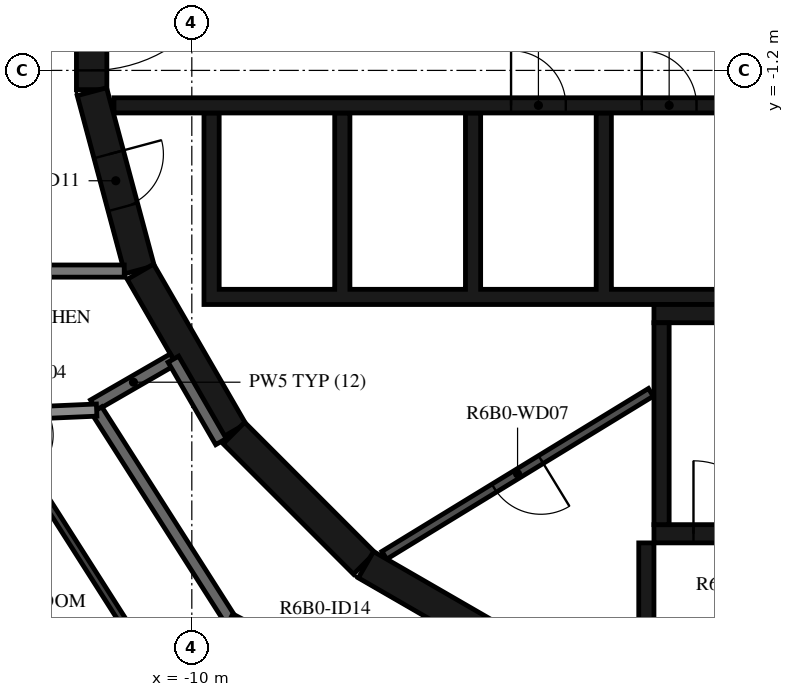
"""IFC4 building model, lengths in metres.
Left out: names, types, materials, properties, quantities, classifications, styles, units other than length and angle.
Written with IfcOpenShell. Run it as: python <this file> out.ifc"""

import sys

from ifc_helpers import new_model, si_unit, direction, frame, frame_2d, origin, place, context, subcontext, project, spatial, polyline, rectangle, outline, extrude, element, fill, save


model = new_model("IFC4")
c1 = context("Model", 3, precision=1e-05, world=origin(), true_north=direction((0.0, 1.0)))
c2 = subcontext(c1, "Body", "Model", "MODEL_VIEW")
j1 = project(units=[si_unit("LENGTHUNIT", "METRE"), si_unit("PLANEANGLEUNIT", "RADIAN")], contexts=[c1])
p1 = place(None, origin())
s1 = spatial("IfcSite", under=j1, at=p1, CompositionType="ELEMENT")
p2 = place(p1, origin())
s2 = spatial("IfcBuilding", under=s1, at=p2, CompositionType="ELEMENT")
p3 = place(p2, frame((0.0, 0.0, 240.7)))
s3 = spatial("IfcBuildingStorey", under=s2, at=p3, CompositionType="ELEMENT", Elevation=240.7)
p4 = place(p3, frame((-11.647, 1.516, 0.0), z_axis=(0.0, 0.0, 1.0), x_axis=(0.0, -1.0, 0.0)))
e1 = element("IfcWall", 1, at=p4, inside=s3, PredefinedType="SHEAR", context=c2, shape_type="SweptSolid", body=[
    extrude(rectangle(XDim=3.033, YDim=0.5, at=frame_2d((1.516, 0.0))), origin(), (0.0, 0.0, 1.0), 3.12),
])
p5 = place(p4, frame((0.316, 0.0, 0.0)))
e2 = element("IfcOpeningElement", 2, at=p5, cuts=e1, PredefinedType="OPENING", context=c2, shape_type="SweptSolid", body=[
    extrude(rectangle(XDim=2.4, YDim=2.1, at=frame_2d((1.2, 1.05))), frame((0.0, 0.26, 0.0), z_axis=(0.0, -1.0, 0.0), x_axis=(1.0, 0.0, 0.0)), (0.0, 0.0, 1.0), 0.52),
])
p6 = place(p3, frame((-11.643, -1.55, 0.0), z_axis=(0.0, 0.0, 1.0), x_axis=(0.258734743916, -0.965948410781, 0.0)))
e3 = element("IfcWall", 3, at=p6, inside=s3, PredefinedType="SHEAR", context=c2, shape_type="SweptSolid", body=[
    extrude(rectangle(XDim=3.033, YDim=0.5, at=frame_2d((1.516, 0.0))), origin(), (0.0, 0.0, 1.0), 3.12),
])
p7 = place(p6, frame((1.066, 0.0, 0.0)))
e4 = element("IfcOpeningElement", 4, at=p7, cuts=e3, PredefinedType="OPENING", context=c2, shape_type="SweptSolid", body=[
    extrude(rectangle(XDim=0.9, YDim=2.1, at=frame_2d((0.45, 1.05))), frame((0.0, 0.26, 0.0), z_axis=(0.0, -1.0, 0.0), x_axis=(1.0, 0.0, 0.0)), (0.0, 0.0, 1.0), 0.52),
])
p8 = place(p3, frame((-10.845, -4.51, 0.0), z_axis=(0.0, 0.0, 1.0), x_axis=(0.500087131594, -0.865975092491, 0.0)))
e5 = element("IfcWall", 5, at=p8, inside=s3, PredefinedType="SHEAR", context=c2, shape_type="SweptSolid", body=[
    extrude(rectangle(XDim=3.033, YDim=0.5, at=frame_2d((1.516, 0.0))), origin(), (0.0, 0.0, 1.0), 3.12),
])
p9 = place(p3, frame((-9.308, -7.164, 0.0), z_axis=(0.0, 0.0, 1.0), x_axis=(0.707106781187, -0.707106781187, 0.0)))
e6 = element("IfcWall", 6, at=p9, inside=s3, PredefinedType="SHEAR", context=c2, shape_type="SweptSolid", body=[
    extrude(rectangle(XDim=3.032, YDim=0.5, at=frame_2d((1.516, 0.0))), origin(), (0.0, 0.0, 1.0), 3.12),
])
p10 = place(p3, frame((-7.137, -9.329, 0.0), z_axis=(0.0, 0.0, 1.0), x_axis=(0.865975092491, -0.500087131594, 0.0)))
e7 = element("IfcWall", 7, at=p10, inside=s3, PredefinedType="SHEAR", context=c2, shape_type="SweptSolid", body=[
    extrude(rectangle(XDim=3.033, YDim=0.5, at=frame_2d((1.516, 0.0))), origin(), (0.0, 0.0, 1.0), 3.12),
])
p11 = place(p3, frame((-2.275, -8.67, 0.0), z_axis=(0.0, 0.0, 1.0), x_axis=(0.0, 1.0, 0.0)))
e8 = element("IfcWall", 8, at=p11, inside=s3, PredefinedType="SHEAR", context=c2, shape_type="SweptSolid", body=[
    extrude(rectangle(XDim=3.32, YDim=0.25, at=frame_2d((1.66, 0.0))), origin(), (0.0, 0.0, 1.0), 3.12),
])
p12 = place(p3, frame((-2.4, -5.2, 0.0), z_axis=(0.0, 0.0, 1.0), x_axis=(1.0, 0.0, 0.0)))
e9 = element("IfcWall", 9, at=p12, inside=s3, PredefinedType="SHEAR", context=c2, shape_type="SweptSolid", body=[
    extrude(rectangle(XDim=7.05, YDim=0.3, at=frame_2d((3.525, 0.0))), origin(), (0.0, 0.0, 1.0), 3.12),
])
p13 = place(p3, frame((-2.4, -8.82, 0.0), z_axis=(0.0, 0.0, 1.0), x_axis=(1.0, 0.0, 0.0)))
e10 = element("IfcWall", 10, at=p13, inside=s3, PredefinedType="SHEAR", context=c2, shape_type="SweptSolid", body=[
    extrude(rectangle(XDim=2.5, YDim=0.3, at=frame_2d((1.25, 0.0))), origin(), (0.0, 0.0, 1.0), 3.12),
])
p14 = place(p13, frame((0.65, 0.0, 0.0)))
e11 = element("IfcOpeningElement", 11, at=p14, cuts=e10, PredefinedType="OPENING", context=c2, shape_type="SweptSolid", body=[
    extrude(rectangle(XDim=1.2, YDim=2.1, at=frame_2d((0.6, 1.05))), frame((0.0, 0.16, 0.0), z_axis=(0.0, -1.0, 0.0), x_axis=(1.0, 0.0, 0.0)), (0.0, 0.0, 1.0), 0.32),
])
p15 = place(p3, frame((-2.525, -8.97, 0.0), z_axis=(0.0, 0.0, 1.0), x_axis=(0.0, -1.0, 0.0)))
e12 = element("IfcWall", 12, at=p15, inside=s3, PredefinedType="SHEAR", context=c2, shape_type="SweptSolid", body=[
    extrude(rectangle(XDim=2.11, YDim=0.25, at=frame_2d((1.055, 0.0))), origin(), (0.0, 0.0, 1.0), 3.12),
])
p16 = place(p3, origin())
e13 = element("IfcWall", 13, at=p16, inside=s3, PredefinedType="SHEAR", context=c2, shape_type="SweptSolid", body=[
    extrude(outline(polyline([(9.8, -5.05), (9.8, -4.8), (9.8, -1.9), (9.55, -1.9), (9.55, -4.8), (7.65, -4.8), (7.65, -1.9), (7.4, -1.9), (7.4, -4.8), (5.5, -4.8), (5.5, -1.9), (5.25, -1.9), (5.25, -4.8), (3.35, -4.8), (3.35, -1.9), (3.1, -1.9), (3.1, -4.8), (1.2, -4.8), (1.2, -1.9), (0.95, -1.9), (0.95, -4.8), (-0.95, -4.8), (-0.95, -1.9), (-1.2, -1.9), (-1.2, -4.8), (-3.1, -4.8), (-3.1, -1.9), (-3.35, -1.9), (-3.35, -4.8), (-5.25, -4.8), (-5.25, -1.9), (-5.5, -1.9), (-5.5, -4.8), (-7.4, -4.8), (-7.4, -1.9), (-7.65, -1.9), (-7.65, -4.8), (-9.55, -4.8), (-9.55, -1.9), (-9.8, -1.9), (-9.8, -4.8), (-9.8, -5.05), (9.8, -5.05)])), origin(), (0.0, 0.0, 1.0), 3.12),
])
p17 = place(p3, frame((-11.28, -1.775, 0.0), z_axis=(0.0, 0.0, 1.0), x_axis=(1.0, 0.0, 0.0)))
e14 = element("IfcWall", 14, at=p17, inside=s3, PredefinedType="SHEAR", context=c2, shape_type="SweptSolid", body=[
    extrude(rectangle(XDim=14.38, YDim=0.25, at=frame_2d((7.19, 0.0))), origin(), (0.0, 0.0, 1.0), 3.12),
])
p18 = place(p17, frame((12.88, 0.0, 0.0)))
e15 = element("IfcOpeningElement", 15, at=p18, cuts=e14, PredefinedType="OPENING", context=c2, shape_type="SweptSolid", body=[
    extrude(rectangle(XDim=1.1, YDim=2.1, at=frame_2d((0.55, 1.05))), frame((0.0, 0.135, 0.0), z_axis=(0.0, -1.0, 0.0), x_axis=(1.0, 0.0, 0.0)), (0.0, 0.0, 1.0), 0.27),
])
p19 = place(p17, frame((6.53, 0.0, 0.0)))
e16 = element("IfcOpeningElement", 16, at=p19, cuts=e14, PredefinedType="OPENING", context=c2, shape_type="SweptSolid", body=[
    extrude(rectangle(XDim=0.9, YDim=2.1, at=frame_2d((0.45, 1.05))), frame((0.0, 0.135, 0.0), z_axis=(0.0, -1.0, 0.0), x_axis=(1.0, 0.0, 0.0)), (0.0, 0.0, 1.0), 0.27),
])
p20 = place(p17, frame((8.68, 0.0, 0.0)))
e17 = element("IfcOpeningElement", 17, at=p20, cuts=e14, PredefinedType="OPENING", context=c2, shape_type="SweptSolid", body=[
    extrude(rectangle(XDim=0.9, YDim=2.1, at=frame_2d((0.45, 1.05))), frame((0.0, 0.135, 0.0), z_axis=(0.0, -1.0, 0.0), x_axis=(1.0, 0.0, 0.0)), (0.0, 0.0, 1.0), 0.27),
])
p21 = place(p17, frame((10.83, 0.0, 0.0)))
e18 = element("IfcOpeningElement", 18, at=p21, cuts=e14, PredefinedType="OPENING", context=c2, shape_type="SweptSolid", body=[
    extrude(rectangle(XDim=0.9, YDim=2.1, at=frame_2d((0.45, 1.05))), frame((0.0, 0.135, 0.0), z_axis=(0.0, -1.0, 0.0), x_axis=(1.0, 0.0, 0.0)), (0.0, 0.0, 1.0), 0.27),
])
p22 = place(p3, frame((-2.451, -6.495, 0.0), z_axis=(0.0, 0.0, 1.0), x_axis=(-0.853250115418, -0.521501908471, 0.0)))
e19 = element("IfcWall", 19, at=p22, inside=s3, PredefinedType="PARTITIONING", context=c2, shape_type="SweptSolid", body=[
    extrude(rectangle(XDim=5.137, YDim=0.15, at=frame_2d((2.569, 0.0))), origin(), (0.0, 0.0, 1.0), 3.12),
])
p23 = place(p22, frame((2.119, 0.0, 0.0)))
e20 = element("IfcOpeningElement", 20, at=p23, cuts=e19, PredefinedType="OPENING", context=c2, shape_type="SweptSolid", body=[
    extrude(rectangle(XDim=0.9, YDim=2.1, at=frame_2d((0.45, 1.05))), frame((0.0, 0.085, 0.0), z_axis=(0.0, -1.0, 0.0), x_axis=(1.0, 0.0, 0.0)), (0.0, 0.0, 1.0), 0.17),
])
p24 = place(p3, frame((-10.303, -5.949, 0.0), z_axis=(0.0, 0.0, 1.0), x_axis=(-0.866043382451, -0.499968858743, 0.0)))
e21 = element("IfcWall", 21, at=p24, inside=s3, PredefinedType="STANDARD", context=c2, shape_type="SweptSolid", body=[
    extrude(rectangle(XDim=1.515, YDim=0.2, at=frame_2d((0.758, 0.0))), origin(), (0.0, 0.0, 1.0), 3.12),
])
p25 = place(p3, frame((-9.52, -7.305, 0.0), z_axis=(0.0, 0.0, 1.0), x_axis=(-0.500028278809, 0.866009076391, 0.0)))
e22 = element("IfcWall", 22, at=p25, inside=s3, PredefinedType="STANDARD", context=c2, shape_type="SweptSolid", body=[
    extrude(rectangle(XDim=1.566, YDim=0.2, at=frame_2d((0.783, 0.0))), origin(), (0.0, 0.0, 1.0), 3.12),
])
p26 = place(p3, frame((-11.565, -6.786, 0.0), z_axis=(0.0, 0.0, 1.0), x_axis=(0.537297327359, -0.843392898958, 0.0)))
e23 = element("IfcWall", 23, at=p26, inside=s3, PredefinedType="STANDARD", context=c2, shape_type="SweptSolid", body=[
    extrude(rectangle(XDim=4.081, YDim=0.2, at=frame_2d((2.041, 0.0))), origin(), (0.0, 0.0, 1.0), 3.12),
])
p27 = place(p3, frame((-9.372, -10.228, 0.0), z_axis=(0.0, 0.0, 1.0), x_axis=(0.887005184532, -0.461759464021, 0.0)))
e24 = element("IfcWall", 24, at=p27, inside=s3, PredefinedType="STANDARD", context=c2, shape_type="SweptSolid", body=[
    extrude(rectangle(XDim=7.181, YDim=0.2, at=frame_2d((3.591, 0.0))), origin(), (0.0, 0.0, 1.0), 3.12),
])
p28 = place(p27, frame((2.391, 0.0, 0.0)))
e25 = element("IfcOpeningElement", 25, at=p28, cuts=e24, PredefinedType="OPENING", context=c2, shape_type="SweptSolid", body=[
    extrude(rectangle(XDim=1.0, YDim=2.1, at=frame_2d((0.5, 1.05))), frame((0.0, 0.11, 0.0), z_axis=(0.0, -1.0, 0.0), x_axis=(1.0, 0.0, 0.0)), (0.0, 0.0, 1.0), 0.22),
])
p29 = place(p3, frame((-17.655, -4.5, 0.0), z_axis=(0.0, 0.0, 1.0), x_axis=(1.0, 0.0, 0.0)))
e26 = element("IfcWall", 26, at=p29, inside=s3, PredefinedType="STANDARD", context=c2, shape_type="SweptSolid", body=[
    extrude(rectangle(XDim=6.543, YDim=0.2, at=frame_2d((3.272, 0.0))), origin(), (0.0, 0.0, 1.0), 3.12),
])
p30 = place(p3, frame((-17.544, -7.047, 0.0), z_axis=(0.0, 0.0, 1.0), x_axis=(0.999046743906, 0.043653218555, 0.0)))
e27 = element("IfcWall", 27, at=p30, inside=s3, PredefinedType="STANDARD", context=c2, shape_type="SweptSolid", body=[
    extrude(rectangle(XDim=5.984, YDim=0.2, at=frame_2d((2.992, 0.0))), origin(), (0.0, 0.0, 1.0), 2.73),
])
p31 = place(p3, frame((-13.295, -6.862, 0.0), z_axis=(0.0, 0.0, 1.0), x_axis=(0.537285929223, -0.84340016022, 0.0)))
e28 = element("IfcWall", 28, at=p31, inside=s3, PredefinedType="PARTITIONING", context=c2, shape_type="SweptSolid", body=[
    extrude(rectangle(XDim=5.349, YDim=0.12, at=frame_2d((2.675, 0.0))), origin(), (0.0, 0.0, 1.0), 3.12),
])
p32 = place(p31, frame((0.4, 0.0, 0.0)))
e29 = element("IfcOpeningElement", 29, at=p32, cuts=e28, PredefinedType="OPENING", context=c2, shape_type="SweptSolid", body=[
    extrude(rectangle(XDim=0.8, YDim=2.1, at=frame_2d((0.4, 1.05))), frame((0.0, 0.07, 0.0), z_axis=(0.0, -1.0, 0.0), x_axis=(1.0, 0.0, 0.0)), (0.0, 0.0, 1.0), 0.14),
])
p33 = place(p14, origin())
e30 = element("IfcDoor", 30, at=p33, inside=s3, OperationType="SINGLE_SWING_LEFT", PredefinedType="DOOR", context=c2, shape_type="SweptSolid", body=[
    extrude(rectangle(XDim=1.2, YDim=2.1, at=frame_2d((0.6, 1.05))), frame((0.0, 0.025, 0.0), z_axis=(0.0, -1.0, 0.0), x_axis=(1.0, 0.0, 0.0)), (0.0, 0.0, 1.0), 0.05),
])
fill(e11, e30)
p34 = place(p5, origin())
e31 = element("IfcDoor", 31, at=p34, inside=s3, OperationType="DOUBLE_DOOR_SINGLE_SWING", PredefinedType="DOOR", context=c2, shape_type="SweptSolid", body=[
    extrude(rectangle(XDim=2.4, YDim=2.1, at=frame_2d((1.2, 1.05))), frame((0.0, 0.025, 0.0), z_axis=(0.0, -1.0, 0.0), x_axis=(1.0, 0.0, 0.0)), (0.0, 0.0, 1.0), 0.05),
])
fill(e2, e31)
p35 = place(p19, origin())
e32 = element("IfcDoor", 32, at=p35, inside=s3, OperationType="SINGLE_SWING_RIGHT", PredefinedType="DOOR", context=c2, shape_type="SweptSolid", body=[
    extrude(rectangle(XDim=0.9, YDim=2.1, at=frame_2d((0.45, 1.05))), frame((0.0, 0.025, 0.0), z_axis=(0.0, -1.0, 0.0), x_axis=(1.0, 0.0, 0.0)), (0.0, 0.0, 1.0), 0.05),
])
fill(e16, e32)
p36 = place(p20, origin())
e33 = element("IfcDoor", 33, at=p36, inside=s3, OperationType="SINGLE_SWING_LEFT", PredefinedType="DOOR", context=c2, shape_type="SweptSolid", body=[
    extrude(rectangle(XDim=0.9, YDim=2.1, at=frame_2d((0.45, 1.05))), frame((0.0, 0.025, 0.0), z_axis=(0.0, -1.0, 0.0), x_axis=(1.0, 0.0, 0.0)), (0.0, 0.0, 1.0), 0.05),
])
fill(e17, e33)
p37 = place(p23, origin())
e34 = element("IfcDoor", 34, at=p37, inside=s3, OperationType="SINGLE_SWING_LEFT", PredefinedType="DOOR", context=c2, shape_type="SweptSolid", body=[
    extrude(rectangle(XDim=0.9, YDim=2.1, at=frame_2d((0.45, 1.05))), frame((0.0, 0.025, 0.0), z_axis=(0.0, -1.0, 0.0), x_axis=(1.0, 0.0, 0.0)), (0.0, 0.0, 1.0), 0.05),
])
fill(e20, e34)
p38 = place(p7, origin())
e35 = element("IfcDoor", 35, at=p38, inside=s3, OperationType="SINGLE_SWING_LEFT", PredefinedType="DOOR", context=c2, shape_type="SweptSolid", body=[
    extrude(rectangle(XDim=0.9, YDim=2.1, at=frame_2d((0.45, 1.05))), frame((0.0, 0.025, 0.0), z_axis=(0.0, -1.0, 0.0), x_axis=(1.0, 0.0, 0.0)), (0.0, 0.0, 1.0), 0.05),
])
fill(e4, e35)
save(model, sys.argv[1])
